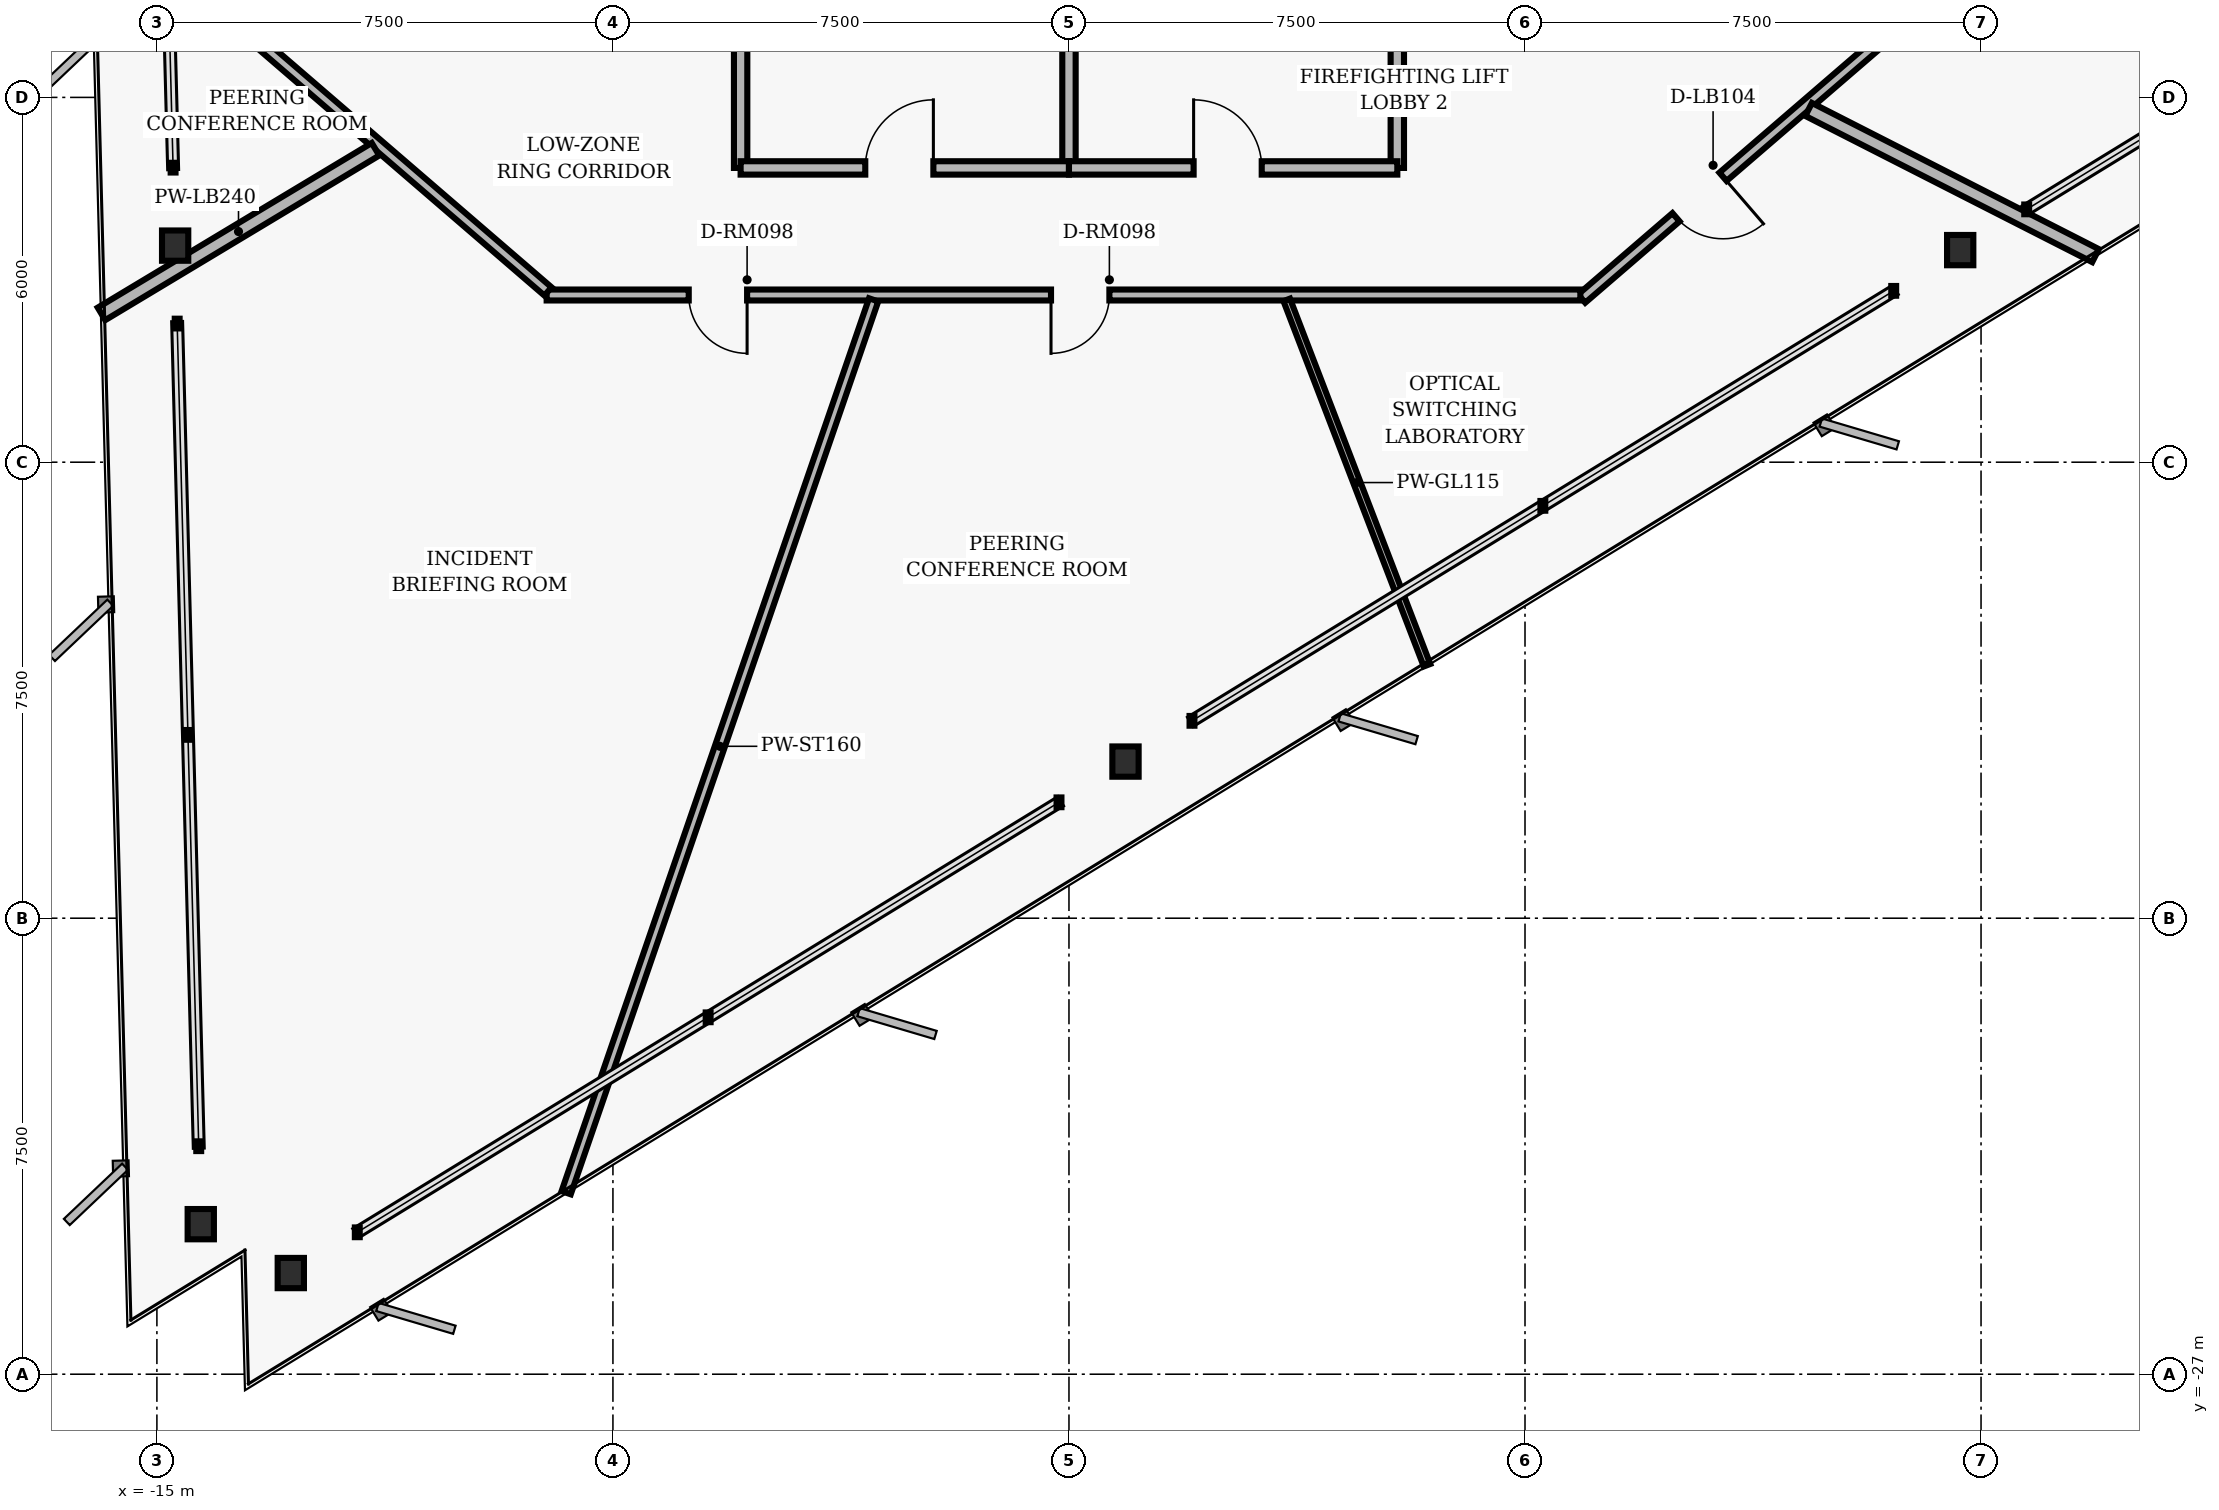
"""IFC4 building model, lengths in metres.
Left out: names, types, materials, properties, quantities, classifications, styles, units other than length and angle.
Written with IfcOpenShell. Run it as: python <this file> out.ifc"""

import sys

from ifc_helpers import new_model, si_unit, direction, frame, frame_2d, origin, origin_2d, place, context, subcontext, project, spatial, rectangle, i_section, extrude, element, fill, save


model = new_model("IFC4")
c1 = context("Model", 3, precision=1e-05, world=origin(), true_north=direction((0.0, 1.0)))
c2 = subcontext(c1, "Body", "Model", "MODEL_VIEW")
j1 = project(units=[si_unit("LENGTHUNIT", "METRE"), si_unit("PLANEANGLEUNIT", "RADIAN")], contexts=[c1])
p1 = place(None, origin())
s1 = spatial("IfcSite", under=j1, at=p1, CompositionType="ELEMENT")
p2 = place(p1, origin())
s2 = spatial("IfcBuilding", under=s1, at=p2, CompositionType="ELEMENT")
p3 = place(p2, frame((0.0, 0.0, 28.96)))
s3 = spatial("IfcBuildingStorey", under=s2, at=p3, CompositionType="ELEMENT", Elevation=28.96)
for number, where, z_axis, x_axis in (
    (1, (-14.7, -8.438, 0.0), (0.0, 0.0, 1.0), (1.0, 0.0, 0.0)),
    (2, (-14.279, -24.532, 0.0), (0.0, 0.0, 1.0), (1.0, 0.0, 0.0)),
    (3, (-12.798, -25.336, 0.0), (0.0, 0.0, 1.0), (1.0, 0.0, 0.0)),
    (4, (0.93, -16.924, 0.0), (0.0, 0.0, 1.0), (1.0, 0.0, 0.0)),
    (5, (14.657, -8.512, 0.0), (0.0, 0.0, 1.0), (1.0, 0.0, 0.0)),
):
    element("IfcColumn", number, at=place(p3, frame(where, z_axis=z_axis, x_axis=x_axis)), inside=s3, PredefinedType="COLUMN", context=c2, shape_type="SweptSolid", body=[
        extrude(i_section(OverallWidth=0.432, OverallDepth=0.498, WebThickness=0.056, FlangeThickness=0.089, FilletRadius=0.025, at=origin_2d()), origin(), (0.0, 0.0, 1.0), 3.36),
    ])
for number, where, z_axis, x_axis in (
    (6, (-5.4, -7.16, 0.0), (0.0, 0.0, 1.0), (0.0, 1.0, 0.0)),
    (7, (5.4, -7.16, 0.0), (0.0, 0.0, 1.0), (0.0, 1.0, 0.0)),
):
    element("IfcWall", number, at=place(p3, frame(where, z_axis=z_axis, x_axis=x_axis)), inside=s3, PredefinedType="PARTITIONING", context=c2, shape_type="SweptSolid", body=[
        extrude(rectangle(XDim=2.71, YDim=0.22, at=frame_2d((1.355, 0.0))), origin(), (0.0, 0.0, 1.0), 3.073),
    ])
p4 = place(p3, frame((0.0, -7.16, 0.0), z_axis=(0.0, 0.0, 1.0), x_axis=(0.0, 1.0, 0.0)))
e8 = element("IfcWall", 8, at=p4, inside=s3, PredefinedType="PARTITIONING", context=c2, shape_type="SweptSolid", body=[
    extrude(rectangle(XDim=2.81, YDim=0.22, at=frame_2d((1.405, 0.0))), origin(), (0.0, 0.0, 1.0), 3.073),
])
p5 = place(p3, frame((-5.4, -7.16, 0.0), z_axis=(0.0, 0.0, 1.0), x_axis=(1.0, 0.0, 0.0)))
e9 = element("IfcWall", 9, at=p5, inside=s3, PredefinedType="PARTITIONING", context=c2, shape_type="SweptSolid", body=[
    extrude(rectangle(XDim=5.4, YDim=0.22, at=frame_2d((2.7, 0.0))), origin(), (0.0, 0.0, 1.0), 3.073),
])
p6 = place(p5, frame((2.05, 0.0, 0.0)))
e10 = element("IfcOpeningElement", 10, at=p6, cuts=e9, PredefinedType="OPENING", context=c2, shape_type="SweptSolid", body=[
    extrude(rectangle(XDim=1.12, YDim=2.02, at=frame_2d((0.56, 1.01))), frame((0.0, 0.12, 0.0), z_axis=(0.0, -1.0, 0.0), x_axis=(1.0, 0.0, 0.0)), (0.0, 0.0, 1.0), 0.24),
])
p7 = place(p3, frame((0.0, -7.16, 0.0), z_axis=(0.0, 0.0, 1.0), x_axis=(1.0, 0.0, 0.0)))
e11 = element("IfcWall", 11, at=p7, inside=s3, PredefinedType="PARTITIONING", context=c2, shape_type="SweptSolid", body=[
    extrude(rectangle(XDim=5.4, YDim=0.22, at=frame_2d((2.7, 0.0))), origin(), (0.0, 0.0, 1.0), 3.073),
])
p8 = place(p7, frame((2.05, 0.0, 0.0)))
e12 = element("IfcOpeningElement", 12, at=p8, cuts=e11, PredefinedType="OPENING", context=c2, shape_type="SweptSolid", body=[
    extrude(rectangle(XDim=1.12, YDim=2.02, at=frame_2d((0.56, 1.01))), frame((0.0, 0.12, 0.0), z_axis=(0.0, -1.0, 0.0), x_axis=(1.0, 0.0, 0.0)), (0.0, 0.0, 1.0), 0.24),
])
p9 = place(p3, frame((13.268, -5.141, 0.0), z_axis=(0.0, 0.0, 1.0), x_axis=(-0.757534501725, -0.65279512766, 0.0)))
e13 = element("IfcWall", 13, at=p9, inside=s3, PredefinedType="PARTITIONING", context=c2, shape_type="SweptSolid", body=[
    extrude(rectangle(XDim=6.385, YDim=0.18, at=frame_2d((3.192, 0.0))), origin(), (0.0, 0.0, 1.0), 2.587),
])
p10 = place(p9, frame((3.316, 0.0, 0.0)))
e14 = element("IfcOpeningElement", 14, at=p10, cuts=e13, PredefinedType="OPENING", context=c2, shape_type="SweptSolid", body=[
    extrude(rectangle(XDim=1.02, YDim=2.02, at=frame_2d((0.51, 1.01))), frame((0.0, 0.1, 0.0), z_axis=(0.0, -1.0, 0.0), x_axis=(1.0, 0.0, 0.0)), (0.0, 0.0, 1.0), 0.2),
])
p11 = place(p3, frame((8.41, -9.25, 0.0), z_axis=(0.0, 0.0, 1.0), x_axis=(-1.0, 0.0, 0.0)))
e15 = element("IfcWall", 15, at=p11, inside=s3, PredefinedType="PARTITIONING", context=c2, shape_type="SweptSolid", body=[
    extrude(rectangle(XDim=17.0, YDim=0.18, at=frame_2d((8.5, 0.0))), origin(), (0.0, 0.0, 1.0), 2.587),
])
p12 = place(p11, frame((13.703, 0.0, 0.0)))
e16 = element("IfcOpeningElement", 16, at=p12, cuts=e15, PredefinedType="OPENING", context=c2, shape_type="SweptSolid", body=[
    extrude(rectangle(XDim=0.96, YDim=2.02, at=frame_2d((0.48, 1.01))), frame((0.0, 0.1, 0.0), z_axis=(0.0, -1.0, 0.0), x_axis=(1.0, 0.0, 0.0)), (0.0, 0.0, 1.0), 0.2),
])
p13 = place(p11, frame((7.745, 0.0, 0.0)))
e17 = element("IfcOpeningElement", 17, at=p13, cuts=e15, PredefinedType="OPENING", context=c2, shape_type="SweptSolid", body=[
    extrude(rectangle(XDim=0.96, YDim=2.02, at=frame_2d((0.48, 1.01))), frame((0.0, 0.1, 0.0), z_axis=(0.0, -1.0, 0.0), x_axis=(1.0, 0.0, 0.0)), (0.0, 0.0, 1.0), 0.2),
])
p14 = place(p3, frame((-8.568, -9.191, 0.0), z_axis=(0.0, 0.0, 1.0), x_axis=(-0.757556899173, 0.652769135694, 0.0)))
e18 = element("IfcWall", 18, at=p14, inside=s3, PredefinedType="PARTITIONING", context=c2, shape_type="SweptSolid", body=[
    extrude(rectangle(XDim=6.204, YDim=0.18, at=frame_2d((3.102, 0.0))), origin(), (0.0, 0.0, 1.0), 3.073),
])
p15 = place(p3, frame((-11.405, -6.853, 0.0), z_axis=(0.0, 0.0, 1.0), x_axis=(-0.857148529273, -0.515069314524, 0.0)))
e19 = element("IfcWall", 19, at=p15, inside=s3, PredefinedType="PARTITIONING", context=c2, shape_type="SweptSolid", body=[
    extrude(rectangle(XDim=5.257, YDim=0.24, at=frame_2d((2.628, 0.0))), origin(), (0.0, 0.0, 1.0), 2.358),
])
p16 = place(p3, frame((-3.213, -9.33, 0.0), z_axis=(0.0, 0.0, 1.0), x_axis=(-0.325559016245, -0.945521722089, 0.0)))
e20 = element("IfcWall", 20, at=p16, inside=s3, PredefinedType="PARTITIONING", context=c2, shape_type="SweptSolid", body=[
    extrude(rectangle(XDim=15.531, YDim=0.16, at=frame_2d((7.766, 0.0))), origin(), (0.0, 0.0, 1.0), 3.073),
])
p17 = place(p3, frame((3.582, -9.33, 0.0), z_axis=(0.0, 0.0, 1.0), x_axis=(0.358341066906, -0.933590745332, 0.0)))
e21 = element("IfcWall", 21, at=p17, inside=s3, PredefinedType="MOVABLE", context=c2, shape_type="SweptSolid", body=[
    extrude(rectangle(XDim=6.437, YDim=0.115, at=frame_2d((3.219, 0.0))), origin(), (0.0, 0.0, 1.0), 3.073),
])
p18 = place(p3, frame((12.164, -6.198, 0.0), z_axis=(0.0, 0.0, 1.0), x_axis=(0.890999034188, -0.454005199394, 0.0)))
e22 = element("IfcWall", 22, at=p18, inside=s3, PredefinedType="PARTITIONING", context=c2, shape_type="SweptSolid", body=[
    extrude(rectangle(XDim=5.296, YDim=0.24, at=frame_2d((2.648, 0.0))), origin(), (0.0, 0.0, 1.0), 2.358),
])
p19 = place(p6, origin())
e23 = element("IfcDoor", 23, at=p19, inside=s3, OperationType="SINGLE_SWING_RIGHT", PredefinedType="DOOR", context=c2, shape_type="SweptSolid", body=[
    extrude(rectangle(XDim=1.12, YDim=2.02, at=frame_2d((0.56, 1.01))), frame((0.0, 0.025, 0.0), z_axis=(0.0, -1.0, 0.0), x_axis=(1.0, 0.0, 0.0)), (0.0, 0.0, 1.0), 0.05),
])
fill(e10, e23)
p20 = place(p8, origin())
e24 = element("IfcDoor", 24, at=p20, inside=s3, OperationType="SINGLE_SWING_LEFT", PredefinedType="DOOR", context=c2, shape_type="SweptSolid", body=[
    extrude(rectangle(XDim=1.12, YDim=2.02, at=frame_2d((0.56, 1.01))), frame((0.0, 0.025, 0.0), z_axis=(0.0, -1.0, 0.0), x_axis=(1.0, 0.0, 0.0)), (0.0, 0.0, 1.0), 0.05),
])
fill(e12, e24)
p21 = place(p12, origin())
e25 = element("IfcDoor", 25, at=p21, inside=s3, OperationType="SINGLE_SWING_LEFT", PredefinedType="DOOR", context=c2, shape_type="SweptSolid", body=[
    extrude(rectangle(XDim=0.96, YDim=2.02, at=frame_2d((0.48, 1.01))), frame((0.0, 0.025, 0.0), z_axis=(0.0, -1.0, 0.0), x_axis=(1.0, 0.0, 0.0)), (0.0, 0.0, 1.0), 0.05),
])
fill(e16, e25)
p22 = place(p13, origin())
e26 = element("IfcDoor", 26, at=p22, inside=s3, OperationType="SINGLE_SWING_RIGHT", PredefinedType="DOOR", context=c2, shape_type="SweptSolid", body=[
    extrude(rectangle(XDim=0.96, YDim=2.02, at=frame_2d((0.48, 1.01))), frame((0.0, 0.025, 0.0), z_axis=(0.0, -1.0, 0.0), x_axis=(1.0, 0.0, 0.0)), (0.0, 0.0, 1.0), 0.05),
])
fill(e17, e26)
p23 = place(p10, origin())
e27 = element("IfcDoor", 27, at=p23, inside=s3, OperationType="SINGLE_SWING_LEFT", PredefinedType="DOOR", context=c2, shape_type="SweptSolid", body=[
    extrude(rectangle(XDim=1.02, YDim=2.02, at=frame_2d((0.51, 1.01))), frame((0.0, 0.025, 0.0), z_axis=(0.0, -1.0, 0.0), x_axis=(1.0, 0.0, 0.0)), (0.0, 0.0, 1.0), 0.05),
])
fill(e14, e27)
save(model, sys.argv[1])
